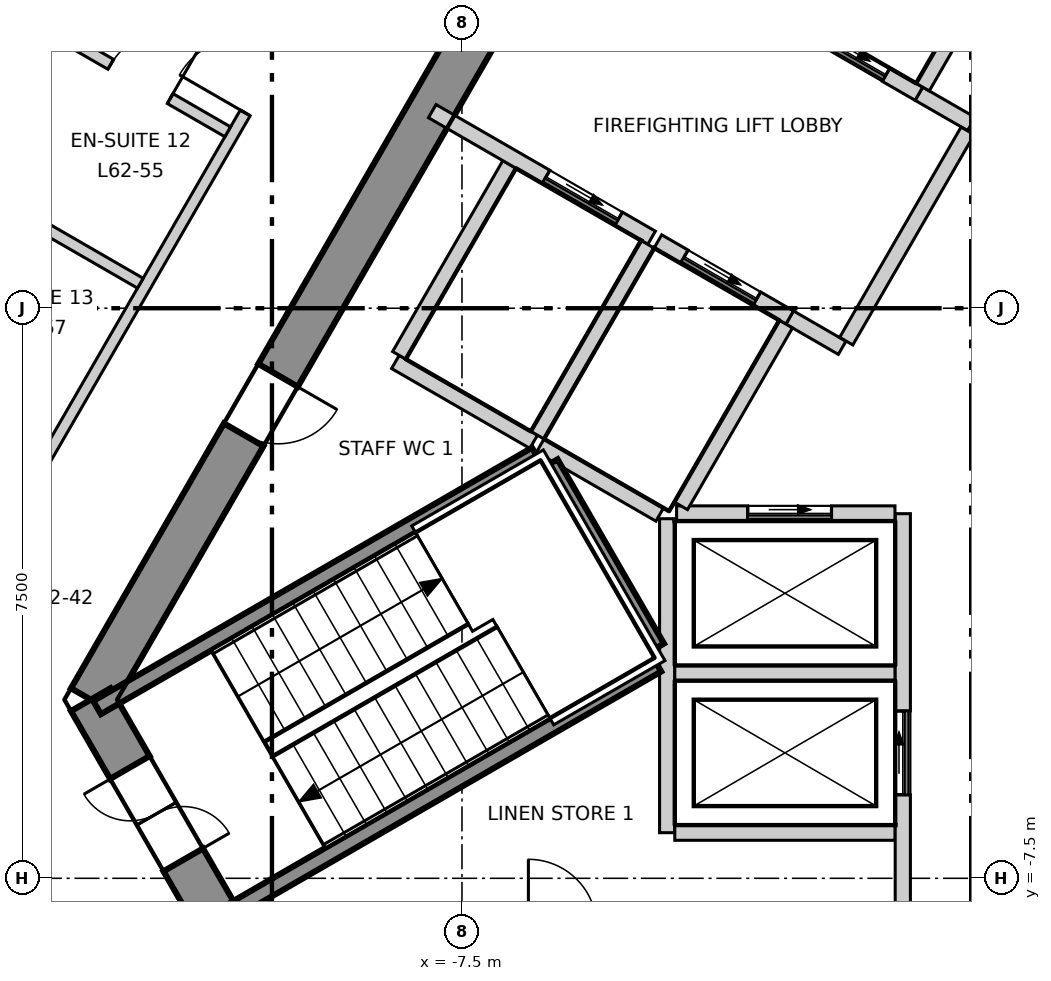
"""IFC4 building model, lengths in metres.
Left out: names, types, materials, properties, quantities, classifications, styles, units other than length and angle.
Written with IfcOpenShell. Run it as: python <this file> out.ifc"""

import sys

from ifc_helpers import new_model, si_unit, direction, frame, frame_2d, origin, place, context, subcontext, project, spatial, polyline, rectangle, outline, extrude, element, fill, save


model = new_model("IFC4")
c1 = context("Model", 3, precision=1e-05, world=origin(), true_north=direction((0.0, 1.0)))
c2 = subcontext(c1, "Body", "Model", "MODEL_VIEW")
j1 = project(units=[si_unit("LENGTHUNIT", "METRE"), si_unit("PLANEANGLEUNIT", "RADIAN")], contexts=[c1])
p1 = place(None, origin())
s1 = spatial("IfcSite", under=j1, at=p1, CompositionType="ELEMENT")
p2 = place(p1, origin())
s2 = spatial("IfcBuilding", under=s1, at=p2, CompositionType="ELEMENT")
p3 = place(p2, frame((0.0, 0.0, 268.3)))
s3 = spatial("IfcBuildingStorey", under=s2, at=p3, CompositionType="ELEMENT", Elevation=268.3)
p4 = place(p3, frame((-1.732, 13.3, -0.3), z_axis=(0.0, 0.0, 1.0), x_axis=(-0.500000539815, -0.866025092122, 0.0)))
e1 = element("IfcWall", 1, at=p4, inside=s3, PredefinedType="SHEAR", context=c2, shape_type="SweptSolid", body=[
    extrude(outline(polyline([(-0.173, -0.3), (1.795, -0.3), (3.763, -0.3), (5.732, -0.3), (7.7, -0.3), (9.668, -0.301), (11.637, -0.301), (13.605, -0.301), (15.573, -0.301), (17.542, -0.301), (19.51, -0.301), (21.478, -0.301), (21.131, 0.3), (19.226, 0.3), (17.321, 0.3), (15.415, 0.3), (13.51, 0.3), (11.605, 0.3), (9.699, 0.3), (7.794, 0.3), (5.889, 0.3), (3.984, 0.3), (2.078, 0.3), (0.173, 0.3), (-0.173, -0.3)])), origin(), (0.0, 0.0, 1.0), 3.6),
])
p5 = place(p4, frame((10.102, 0.0, 0.3)))
e2 = element("IfcOpeningElement", 2, at=p5, cuts=e1, PredefinedType="OPENING", context=c2, shape_type="SweptSolid", body=[
    extrude(rectangle(XDim=1.1, YDim=2.1, at=frame_2d((0.55, 1.05))), frame((0.0, 0.31, 0.0), z_axis=(0.0, -1.0, 0.0), x_axis=(1.0, 0.0, 0.0)), (0.0, 0.0, 1.0), 0.621),
])
p6 = place(p4, frame((16.378, 0.0, 0.3)))
e3 = element("IfcOpeningElement", 3, at=p6, cuts=e1, PredefinedType="OPENING", context=c2, shape_type="SweptSolid", body=[
    extrude(rectangle(XDim=0.9, YDim=2.1, at=frame_2d((0.45, 1.05))), frame((0.0, 0.31, 0.0), z_axis=(0.0, -1.0, 0.0), x_axis=(1.0, 0.0, 0.0)), (0.0, 0.0, 1.0), 0.621),
])
p7 = place(p4, frame((4.026, 0.0, 0.3)))
e4 = element("IfcOpeningElement", 4, at=p7, cuts=e1, PredefinedType="OPENING", context=c2, shape_type="SweptSolid", body=[
    extrude(rectangle(XDim=0.9, YDim=2.1, at=frame_2d((0.45, 1.05))), frame((0.0, 0.31, 0.0), z_axis=(0.0, -1.0, 0.0), x_axis=(1.0, 0.0, 0.0)), (0.0, 0.0, 1.0), 0.621),
])
p8 = place(p3, frame((-12.384, -5.15, -0.3), z_axis=(0.0, 0.0, 1.0), x_axis=(0.49997462182, -0.866040055388, 0.0)))
e5 = element("IfcWall", 5, at=p8, inside=s3, PredefinedType="SHEAR", context=c2, shape_type="SweptSolid", body=[
    extrude(outline(polyline([(-0.173, -0.301), (1.732, -0.301), (3.637, -0.3), (3.291, 0.3), (1.732, 0.3), (0.173, 0.3), (-0.173, -0.301)])), origin(), (0.0, 0.0, 1.0), 3.6),
])
p9 = place(p8, frame((1.032, 0.0, 0.3)))
e6 = element("IfcOpeningElement", 6, at=p9, cuts=e5, PredefinedType="OPENING", context=c2, shape_type="SweptSolid", body=[
    extrude(rectangle(XDim=1.4, YDim=2.1, at=frame_2d((0.7, 1.05))), frame((0.0, 0.31, 0.0), z_axis=(0.0, -1.0, 0.0), x_axis=(1.0, 0.0, 0.0)), (0.0, 0.0, 1.0), 0.621),
])
p10 = place(p3, frame((-2.577, 28.771, 0.0), z_axis=(0.0, 0.0, 1.0), x_axis=(-0.49999909388, -0.866025926932, 0.0)))
e7 = element("IfcWall", 7, at=p10, inside=s3, PredefinedType="ELEMENTEDWALL", context=c2, shape_type="SweptSolid", body=[
    extrude(rectangle(XDim=47.236, YDim=0.2, at=frame_2d((23.618, 0.0))), origin(), (0.0, 0.0, 1.0), 3.3),
])
p11 = place(p10, frame((2.243, 0.0, 0.9)))
e8 = element("IfcOpeningElement", 8, at=p11, cuts=e7, PredefinedType="OPENING", context=c2, shape_type="SweptSolid", body=[
    extrude(rectangle(XDim=3.7, YDim=2.2, at=frame_2d((1.85, 1.1))), frame((0.0, 0.11, 0.0), z_axis=(0.0, -1.0, 0.0), x_axis=(1.0, 0.0, 0.0)), (0.0, 0.0, 1.0), 0.22),
])
p12 = place(p10, frame((7.824, 0.0, 0.9)))
e9 = element("IfcOpeningElement", 9, at=p12, cuts=e7, PredefinedType="OPENING", context=c2, shape_type="SweptSolid", body=[
    extrude(rectangle(XDim=3.7, YDim=2.2, at=frame_2d((1.85, 1.1))), frame((0.0, 0.11, 0.0), z_axis=(0.0, -1.0, 0.0), x_axis=(1.0, 0.0, 0.0)), (0.0, 0.0, 1.0), 0.22),
])
p13 = place(p10, frame((13.406, 0.0, 0.9)))
e10 = element("IfcOpeningElement", 10, at=p13, cuts=e7, PredefinedType="OPENING", context=c2, shape_type="SweptSolid", body=[
    extrude(rectangle(XDim=3.7, YDim=2.2, at=frame_2d((1.85, 1.1))), frame((0.0, 0.11, 0.0), z_axis=(0.0, -1.0, 0.0), x_axis=(1.0, 0.0, 0.0)), (0.0, 0.0, 1.0), 0.22),
])
p14 = place(p10, frame((18.987, 0.0, 0.9)))
e11 = element("IfcOpeningElement", 11, at=p14, cuts=e7, PredefinedType="OPENING", context=c2, shape_type="SweptSolid", body=[
    extrude(rectangle(XDim=3.7, YDim=2.2, at=frame_2d((1.85, 1.1))), frame((0.0, 0.11, 0.0), z_axis=(0.0, -1.0, 0.0), x_axis=(1.0, 0.0, 0.0)), (0.0, 0.0, 1.0), 0.22),
])
p15 = place(p10, frame((24.569, 0.0, 0.9)))
e12 = element("IfcOpeningElement", 12, at=p15, cuts=e7, PredefinedType="OPENING", context=c2, shape_type="SweptSolid", body=[
    extrude(rectangle(XDim=3.7, YDim=2.2, at=frame_2d((1.85, 1.1))), frame((0.0, 0.11, 0.0), z_axis=(0.0, -1.0, 0.0), x_axis=(1.0, 0.0, 0.0)), (0.0, 0.0, 1.0), 0.22),
])
p16 = place(p10, frame((30.15, 0.0, 0.9)))
e13 = element("IfcOpeningElement", 13, at=p16, cuts=e7, PredefinedType="OPENING", context=c2, shape_type="SweptSolid", body=[
    extrude(rectangle(XDim=3.7, YDim=2.2, at=frame_2d((1.85, 1.1))), frame((0.0, 0.11, 0.0), z_axis=(0.0, -1.0, 0.0), x_axis=(1.0, 0.0, 0.0)), (0.0, 0.0, 1.0), 0.22),
])
p17 = place(p10, frame((35.731, 0.0, 0.9)))
e14 = element("IfcOpeningElement", 14, at=p17, cuts=e7, PredefinedType="OPENING", context=c2, shape_type="SweptSolid", body=[
    extrude(rectangle(XDim=3.7, YDim=2.2, at=frame_2d((1.85, 1.1))), frame((0.0, 0.11, 0.0), z_axis=(0.0, -1.0, 0.0), x_axis=(1.0, 0.0, 0.0)), (0.0, 0.0, 1.0), 0.22),
])
p18 = place(p10, frame((41.313, 0.0, 0.9)))
e15 = element("IfcOpeningElement", 15, at=p18, cuts=e7, PredefinedType="OPENING", context=c2, shape_type="SweptSolid", body=[
    extrude(rectangle(XDim=3.7, YDim=2.2, at=frame_2d((1.85, 1.1))), frame((0.0, 0.11, 0.0), z_axis=(0.0, -1.0, 0.0), x_axis=(1.0, 0.0, 0.0)), (0.0, 0.0, 1.0), 0.22),
])
p19 = place(p3, frame((-17.678, -10.12, 0.0), z_axis=(0.0, 0.0, 1.0), x_axis=(0.49998824015, 0.86603219323, 0.0)))
e16 = element("IfcWall", 16, at=p19, inside=s3, PredefinedType="PARTITIONING", context=c2, shape_type="SweptSolid", body=[
    extrude(rectangle(XDim=35.357, YDim=0.15, at=frame_2d((17.678, 0.0))), origin(), (0.0, 0.0, 1.0), 3.3),
])
p20 = place(p19, frame((31.607, 0.0, 0.0)))
e17 = element("IfcOpeningElement", 17, at=p20, cuts=e16, PredefinedType="OPENING", context=c2, shape_type="SweptSolid", body=[
    extrude(rectangle(XDim=1.0, YDim=2.1, at=frame_2d((0.5, 1.05))), frame((0.0, 0.085, 0.0), z_axis=(0.0, -1.0, 0.0), x_axis=(1.0, 0.0, 0.0)), (0.0, 0.0, 1.0), 0.17),
])
p21 = place(p19, frame((19.416, 0.0, 0.0)))
e18 = element("IfcOpeningElement", 18, at=p21, cuts=e16, PredefinedType="OPENING", context=c2, shape_type="SweptSolid", body=[
    extrude(rectangle(XDim=1.0, YDim=2.1, at=frame_2d((0.5, 1.05))), frame((0.0, 0.085, 0.0), z_axis=(0.0, -1.0, 0.0), x_axis=(1.0, 0.0, 0.0)), (0.0, 0.0, 1.0), 0.17),
])
p22 = place(p19, frame((24.916, 0.0, 0.0)))
e19 = element("IfcOpeningElement", 19, at=p22, cuts=e16, PredefinedType="OPENING", context=c2, shape_type="SweptSolid", body=[
    extrude(rectangle(XDim=0.9, YDim=2.1, at=frame_2d((0.45, 1.05))), frame((0.0, 0.085, 0.0), z_axis=(0.0, -1.0, 0.0), x_axis=(1.0, 0.0, 0.0)), (0.0, 0.0, 1.0), 0.17),
])
p23 = place(p19, frame((22.816, 0.0, 0.0)))
e20 = element("IfcOpeningElement", 20, at=p23, cuts=e16, PredefinedType="OPENING", context=c2, shape_type="SweptSolid", body=[
    extrude(rectangle(XDim=0.9, YDim=2.1, at=frame_2d((0.45, 1.05))), frame((0.0, 0.085, 0.0), z_axis=(0.0, -1.0, 0.0), x_axis=(1.0, 0.0, 0.0)), (0.0, 0.0, 1.0), 0.17),
])
p24 = place(p19, frame((14.654, 0.0, 0.0)))
e21 = element("IfcOpeningElement", 21, at=p24, cuts=e16, PredefinedType="OPENING", context=c2, shape_type="SweptSolid", body=[
    extrude(rectangle(XDim=1.0, YDim=2.1, at=frame_2d((0.5, 1.05))), frame((0.0, 0.085, 0.0), z_axis=(0.0, -1.0, 0.0), x_axis=(1.0, 0.0, 0.0)), (0.0, 0.0, 1.0), 0.17),
])
p25 = place(p19, frame((7.672, 0.0, 0.0)))
e22 = element("IfcOpeningElement", 22, at=p25, cuts=e16, PredefinedType="OPENING", context=c2, shape_type="SweptSolid", body=[
    extrude(rectangle(XDim=1.0, YDim=2.1, at=frame_2d((0.5, 1.05))), frame((0.0, 0.085, 0.0), z_axis=(0.0, -1.0, 0.0), x_axis=(1.0, 0.0, 0.0)), (0.0, 0.0, 1.0), 0.17),
])
p26 = place(p19, frame((2.69, 0.0, 0.0)))
e23 = element("IfcOpeningElement", 23, at=p26, cuts=e16, PredefinedType="OPENING", context=c2, shape_type="SweptSolid", body=[
    extrude(rectangle(XDim=1.0, YDim=2.1, at=frame_2d((0.5, 1.05))), frame((0.0, 0.085, 0.0), z_axis=(0.0, -1.0, 0.0), x_axis=(1.0, 0.0, 0.0)), (0.0, 0.0, 1.0), 0.17),
])
p27 = place(p3, frame((-17.112, 3.435, 0.0), z_axis=(0.0, 0.0, 1.0), x_axis=(0.866043575568, -0.499968524226, 0.0)))
e24 = element("IfcWall", 24, at=p27, inside=s3, PredefinedType="PARTITIONING", context=c2, shape_type="SweptSolid", body=[
    extrude(rectangle(XDim=6.212, YDim=0.15, at=frame_2d((3.106, 0.0))), origin(), (0.0, 0.0, 1.0), 3.3),
])
p28 = place(p3, frame((-12.856, 3.633, 0.0), z_axis=(0.0, 0.0, 1.0), x_axis=(0.866163910271, -0.499760022954, 0.0)))
e25 = element("IfcWall", 25, at=p28, inside=s3, PredefinedType="PARTITIONING", context=c2, shape_type="SweptSolid", body=[
    extrude(rectangle(XDim=2.625, YDim=0.15, at=frame_2d((1.312, 0.0))), origin(), (0.0, 0.0, 1.0), 3.3),
])
p29 = place(p28, frame((0.85, 0.0, 0.0)))
e26 = element("IfcOpeningElement", 26, at=p29, cuts=e25, PredefinedType="OPENING", context=c2, shape_type="SweptSolid", body=[
    extrude(rectangle(XDim=0.9, YDim=2.1, at=frame_2d((0.45, 1.05))), frame((0.0, 0.085, 0.0), z_axis=(0.0, -1.0, 0.0), x_axis=(1.0, 0.0, 0.0)), (0.0, 0.0, 1.0), 0.17),
])
p30 = place(p3, frame((-13.968, 1.707, 0.0), z_axis=(0.0, 0.0, 1.0), x_axis=(0.500158362642, 0.865933953763, 0.0)))
e27 = element("IfcWall", 27, at=p30, inside=s3, PredefinedType="PARTITIONING", context=c2, shape_type="SweptSolid", body=[
    extrude(rectangle(XDim=2.149, YDim=0.15, at=frame_2d((1.075, 0.0))), origin(), (0.0, 0.0, 1.0), 3.3),
])
p31 = place(p3, frame((-8.376, -0.707, 0.0), z_axis=(0.0, 0.0, 1.0), x_axis=(0.866067520717, -0.499927044236, 0.0)))
e28 = element("IfcWall", 28, at=p31, inside=s3, PredefinedType="SOLIDWALL", context=c2, shape_type="SweptSolid", body=[
    extrude(rectangle(XDim=2.1, YDim=0.2, at=frame_2d((1.05, 0.0))), origin(), (0.0, 0.0, 1.0), 3.3),
])
p32 = place(p3, frame((-8.326, -0.62, 0.0), z_axis=(0.0, 0.0, 1.0), x_axis=(0.500023687443, 0.866011727401, 0.0)))
e29 = element("IfcWall", 29, at=p32, inside=s3, PredefinedType="SOLIDWALL", context=c2, shape_type="SweptSolid", body=[
    extrude(rectangle(XDim=2.9, YDim=0.2, at=frame_2d((1.45, 0.0))), origin(), (0.0, 0.0, 1.0), 3.3),
])
p33 = place(p3, frame((-4.8, -6.9, 0.0), z_axis=(0.0, 0.0, 1.0), x_axis=(0.0, 1.0, 0.0)))
e30 = element("IfcWall", 30, at=p33, inside=s3, PredefinedType="SOLIDWALL", context=c2, shape_type="SweptSolid", body=[
    extrude(rectangle(XDim=4.131, YDim=0.2, at=frame_2d((2.065, 0.0))), origin(), (0.0, 0.0, 1.0), 3.3),
])
for number, where, z_axis, x_axis in (
    (31, (-4.7, -6.9, 0.0), (0.0, 0.0, 1.0), (1.0, 0.0, 0.0)),
    (32, (-4.7, -4.8, 0.0), (0.0, 0.0, 1.0), (1.0, 0.0, 0.0)),
):
    element("IfcWall", number, at=place(p3, frame(where, z_axis=z_axis, x_axis=x_axis)), inside=s3, PredefinedType="SOLIDWALL", context=c2, shape_type="SweptSolid", body=[
        extrude(rectangle(XDim=2.9, YDim=0.2, at=frame_2d((1.45, 0.0))), origin(), (0.0, 0.0, 1.0), 3.3),
    ])
p34 = place(p3, frame((-1.7, -8.13, 0.0), z_axis=(0.0, 0.0, 1.0), x_axis=(0.0, 1.0, 0.0)))
e33 = element("IfcWall", 33, at=p34, inside=s3, PredefinedType="SOLIDWALL", context=c2, shape_type="SweptSolid", body=[
    extrude(rectangle(XDim=5.427, YDim=0.2, at=frame_2d((2.713, 0.0))), origin(), (0.0, 0.0, 1.0), 3.3),
])
p35 = place(p34, frame((1.73, 0.0, 0.0)))
e34 = element("IfcOpeningElement", 34, at=p35, cuts=e33, PredefinedType="OPENING", context=c2, shape_type="SweptSolid", body=[
    extrude(rectangle(XDim=1.1, YDim=2.1, at=frame_2d((0.55, 1.05))), frame((0.0, 0.11, 0.0), z_axis=(0.0, -1.0, 0.0), x_axis=(1.0, 0.0, 0.0)), (0.0, 0.0, 1.0), 0.22),
])
p36 = place(p3, frame((-4.676, -2.7, 0.0), z_axis=(0.0, 0.0, 1.0), x_axis=(1.0, 0.0, 0.0)))
e35 = element("IfcWall", 35, at=p36, inside=s3, PredefinedType="SOLIDWALL", context=c2, shape_type="SweptSolid", body=[
    extrude(rectangle(XDim=2.873, YDim=0.2, at=frame_2d((1.437, 0.0))), origin(), (0.0, 0.0, 1.0), 3.3),
])
p37 = place(p36, frame((0.937, 0.0, 0.0)))
e36 = element("IfcOpeningElement", 36, at=p37, cuts=e35, PredefinedType="OPENING", context=c2, shape_type="SweptSolid", body=[
    extrude(rectangle(XDim=1.1, YDim=2.1, at=frame_2d((0.55, 1.05))), frame((0.0, 0.11, 0.0), z_axis=(0.0, -1.0, 0.0), x_axis=(1.0, 0.0, 0.0)), (0.0, 0.0, 1.0), 0.22),
])
p38 = place(p3, frame((-7.891, 2.593, 0.0), z_axis=(0.0, 0.0, 1.0), x_axis=(0.866070917804, -0.499921159118, 0.0)))
e37 = element("IfcWall", 37, at=p38, inside=s3, PredefinedType="SOLIDWALL", context=c2, shape_type="SweptSolid", body=[
    extrude(rectangle(XDim=3.333, YDim=0.2, at=frame_2d((1.666, 0.0))), origin(), (0.0, 0.0, 1.0), 3.3),
])
p39 = place(p38, frame((1.73, 0.0, 0.0)))
e38 = element("IfcOpeningElement", 38, at=p39, cuts=e37, PredefinedType="OPENING", context=c2, shape_type="SweptSolid", body=[
    extrude(rectangle(XDim=1.1, YDim=2.1, at=frame_2d((0.55, 1.05))), frame((0.0, 0.11, 0.0), z_axis=(0.0, -1.0, 0.0), x_axis=(1.0, 0.0, 0.0)), (0.0, 0.0, 1.0), 0.22),
])
p40 = place(p3, frame((-3.188, -0.122, 0.0), z_axis=(0.0, 0.0, 1.0), x_axis=(0.865705793592, -0.50055317294, 0.0)))
e39 = element("IfcWall", 39, at=p40, inside=s3, PredefinedType="SOLIDWALL", context=c2, shape_type="SweptSolid", body=[
    extrude(rectangle(XDim=0.797, YDim=0.2, at=frame_2d((0.398, 0.0))), origin(), (0.0, 0.0, 1.0), 3.3),
])
p41 = place(p3, frame((-1.488, 2.822, 0.0), z_axis=(0.0, 0.0, 1.0), x_axis=(0.866236612152, -0.499633997809, 0.0)))
e40 = element("IfcWall", 40, at=p41, inside=s3, PredefinedType="SOLIDWALL", context=c2, shape_type="SweptSolid", body=[
    extrude(rectangle(XDim=0.796, YDim=0.2, at=frame_2d((0.398, 0.0))), origin(), (0.0, 0.0, 1.0), 3.3),
])
p42 = place(p3, frame((-2.444, -0.433, 0.0), z_axis=(0.0, 0.0, 1.0), x_axis=(0.500035624827, 0.866004834804, 0.0)))
e41 = element("IfcWall", 41, at=p42, inside=s3, PredefinedType="SOLIDWALL", context=c2, shape_type="SweptSolid", body=[
    extrude(rectangle(XDim=3.194, YDim=0.2, at=frame_2d((1.597, 0.0))), origin(), (0.0, 0.0, 1.0), 3.3),
])
p43 = place(p3, frame((-6.507, -1.67, 0.0), z_axis=(0.0, 0.0, 1.0), x_axis=(0.50012328804, 0.865954211699, 0.0)))
e42 = element("IfcWall", 42, at=p43, inside=s3, PredefinedType="SOLIDWALL", context=c2, shape_type="SweptSolid", body=[
    extrude(rectangle(XDim=2.9, YDim=0.2, at=frame_2d((1.45, 0.0))), origin(), (0.0, 0.0, 1.0), 3.3),
])
p44 = place(p3, frame((-6.47, -1.807, 0.0), z_axis=(0.0, 0.0, 1.0), x_axis=(0.865883195159, -0.500246231712, 0.0)))
e43 = element("IfcWall", 43, at=p44, inside=s3, PredefinedType="SOLIDWALL", context=c2, shape_type="SweptSolid", body=[
    extrude(rectangle(XDim=1.815, YDim=0.2, at=frame_2d((0.908, 0.0))), origin(), (0.0, 0.0, 1.0), 3.3),
])
p45 = place(p3, frame((-4.922, 0.879, 0.0), z_axis=(0.0, 0.0, 1.0), x_axis=(0.866073918653, -0.499915960366, 0.0)))
e44 = element("IfcWall", 44, at=p45, inside=s3, PredefinedType="SOLIDWALL", context=c2, shape_type="SweptSolid", body=[
    extrude(rectangle(XDim=2.002, YDim=0.2, at=frame_2d((1.001, 0.0))), origin(), (0.0, 0.0, 1.0), 3.3),
])
p46 = place(p45, frame((0.402, 0.0, 0.0)))
e45 = element("IfcOpeningElement", 45, at=p46, cuts=e44, PredefinedType="OPENING", context=c2, shape_type="SweptSolid", body=[
    extrude(rectangle(XDim=1.1, YDim=2.1, at=frame_2d((0.55, 1.05))), frame((0.0, 0.11, 0.0), z_axis=(0.0, -1.0, 0.0), x_axis=(1.0, 0.0, 0.0)), (0.0, 0.0, 1.0), 0.22),
])
p47 = place(p3, frame((-4.619, -2.6, 0.0), z_axis=(0.0, 0.0, 1.0), x_axis=(0.50009492287, 0.865970593103, 0.0)))
e46 = element("IfcWall", 46, at=p47, inside=s3, PredefinedType="SOLIDWALL", context=c2, shape_type="SweptSolid", body=[
    extrude(rectangle(XDim=2.761, YDim=0.2, at=frame_2d((1.381, 0.0))), origin(), (0.0, 0.0, 1.0), 3.3),
])
p48 = place(p3, frame((-3.309, 3.873, 0.0), z_axis=(0.0, 0.0, 1.0), x_axis=(0.866098583652, -0.499873227325, 0.0)))
e47 = element("IfcWall", 47, at=p48, inside=s3, PredefinedType="SOLIDWALL", context=c2, shape_type="SweptSolid", body=[
    extrude(rectangle(XDim=2.103, YDim=0.2, at=frame_2d((1.051, 0.0))), origin(), (0.0, 0.0, 1.0), 3.3),
])
p49 = place(p48, frame((0.502, 0.0, 0.0)))
e48 = element("IfcOpeningElement", 48, at=p49, cuts=e47, PredefinedType="OPENING", context=c2, shape_type="SweptSolid", body=[
    extrude(rectangle(XDim=1.1, YDim=2.1, at=frame_2d((0.55, 1.05))), frame((0.0, 0.11, 0.0), z_axis=(0.0, -1.0, 0.0), x_axis=(1.0, 0.0, 0.0)), (0.0, 0.0, 1.0), 0.22),
])
p50 = place(p3, frame((-1.438, 2.909, 0.0), z_axis=(0.0, 0.0, 1.0), x_axis=(0.499829630636, 0.866123744241, 0.0)))
e49 = element("IfcWall", 49, at=p50, inside=s3, PredefinedType="SOLIDWALL", context=c2, shape_type="SweptSolid", body=[
    extrude(rectangle(XDim=2.761, YDim=0.2, at=frame_2d((1.38, 0.0))), origin(), (0.0, 0.0, 1.0), 3.3),
])
p51 = place(p3, frame((-12.301, -5.254, 0.0), z_axis=(0.0, 0.0, 1.0), x_axis=(0.866068467981, 0.499925403204, 0.0)))
e50 = element("IfcWall", 50, at=p51, inside=s3, PredefinedType="SOLIDWALL", context=c2, shape_type="SweptSolid", body=[
    extrude(rectangle(XDim=6.665, YDim=0.2, at=frame_2d((3.332, 0.0))), origin(), (0.0, 0.0, 1.0), 3.3),
])
p52 = place(p3, frame((-6.329, -2.038, 0.0), z_axis=(0.0, 0.0, 1.0), x_axis=(0.500200581029, -0.865909567298, 0.0)))
e51 = element("IfcWall", 51, at=p52, inside=s3, PredefinedType="SOLIDWALL", context=c2, shape_type="SweptSolid", body=[
    extrude(rectangle(XDim=2.799, YDim=0.2, at=frame_2d((1.399, 0.0))), origin(), (0.0, 0.0, 1.0), 3.3),
])
p53 = place(p3, frame((-10.701, -8.026, 0.0), z_axis=(0.0, 0.0, 1.0), x_axis=(0.866005022404, 0.500035299925, 0.0)))
e52 = element("IfcWall", 52, at=p53, inside=s3, PredefinedType="SOLIDWALL", context=c2, shape_type="SweptSolid", body=[
    extrude(rectangle(XDim=6.665, YDim=0.2, at=frame_2d((3.333, 0.0))), origin(), (0.0, 0.0, 1.0), 3.3),
])
p54 = place(p37, origin())
e53 = element("IfcDoor", 53, at=p54, inside=s3, OperationType="SLIDING_TO_LEFT", PredefinedType="DOOR", context=c2, shape_type="SweptSolid", body=[
    extrude(rectangle(XDim=1.1, YDim=2.1, at=frame_2d((0.55, 1.05))), frame((0.0, 0.025, 0.0), z_axis=(0.0, -1.0, 0.0), x_axis=(1.0, 0.0, 0.0)), (0.0, 0.0, 1.0), 0.05),
])
fill(e36, e53)
p55 = place(p35, origin())
e54 = element("IfcDoor", 54, at=p55, inside=s3, OperationType="SLIDING_TO_LEFT", PredefinedType="DOOR", context=c2, shape_type="SweptSolid", body=[
    extrude(rectangle(XDim=1.1, YDim=2.1, at=frame_2d((0.55, 1.05))), frame((0.0, 0.025, 0.0), z_axis=(0.0, -1.0, 0.0), x_axis=(1.0, 0.0, 0.0)), (0.0, 0.0, 1.0), 0.05),
])
fill(e34, e54)
p56 = place(p46, origin())
e55 = element("IfcDoor", 55, at=p56, inside=s3, OperationType="SLIDING_TO_LEFT", PredefinedType="DOOR", context=c2, shape_type="SweptSolid", body=[
    extrude(rectangle(XDim=1.1, YDim=2.1, at=frame_2d((0.55, 1.05))), frame((0.0, 0.025, 0.0), z_axis=(0.0, -1.0, 0.0), x_axis=(1.0, 0.0, 0.0)), (0.0, 0.0, 1.0), 0.05),
])
fill(e45, e55)
p57 = place(p49, origin())
e56 = element("IfcDoor", 56, at=p57, inside=s3, OperationType="SLIDING_TO_LEFT", PredefinedType="DOOR", context=c2, shape_type="SweptSolid", body=[
    extrude(rectangle(XDim=1.1, YDim=2.1, at=frame_2d((0.55, 1.05))), frame((0.0, 0.025, 0.0), z_axis=(0.0, -1.0, 0.0), x_axis=(1.0, 0.0, 0.0)), (0.0, 0.0, 1.0), 0.05),
])
fill(e48, e56)
p58 = place(p39, origin())
e57 = element("IfcDoor", 57, at=p58, inside=s3, OperationType="SLIDING_TO_LEFT", PredefinedType="DOOR", context=c2, shape_type="SweptSolid", body=[
    extrude(rectangle(XDim=1.1, YDim=2.1, at=frame_2d((0.55, 1.05))), frame((0.0, 0.025, 0.0), z_axis=(0.0, -1.0, 0.0), x_axis=(1.0, 0.0, 0.0)), (0.0, 0.0, 1.0), 0.05),
])
fill(e38, e57)
p59 = place(p24, origin())
e58 = element("IfcDoor", 58, at=p59, inside=s3, OperationType="SINGLE_SWING_RIGHT", PredefinedType="DOOR", context=c2, shape_type="SweptSolid", body=[
    extrude(rectangle(XDim=1.0, YDim=2.1, at=frame_2d((0.5, 1.05))), frame((0.0, 0.025, 0.0), z_axis=(0.0, -1.0, 0.0), x_axis=(1.0, 0.0, 0.0)), (0.0, 0.0, 1.0), 0.05),
])
fill(e21, e58)
p60 = place(p29, origin())
e59 = element("IfcDoor", 59, at=p60, inside=s3, OperationType="SINGLE_SWING_LEFT", PredefinedType="DOOR", context=c2, shape_type="SweptSolid", body=[
    extrude(rectangle(XDim=0.9, YDim=2.1, at=frame_2d((0.45, 1.05))), frame((0.0, 0.025, 0.0), z_axis=(0.0, -1.0, 0.0), x_axis=(1.0, 0.0, 0.0)), (0.0, 0.0, 1.0), 0.05),
])
fill(e26, e59)
p61 = place(p9, origin())
e60 = element("IfcDoor", 60, at=p61, inside=s3, OperationType="DOUBLE_DOOR_SINGLE_SWING", PredefinedType="DOOR", context=c2, shape_type="SweptSolid", body=[
    extrude(rectangle(XDim=1.4, YDim=2.1, at=frame_2d((0.7, 1.05))), frame((0.0, 0.025, 0.0), z_axis=(0.0, -1.0, 0.0), x_axis=(1.0, 0.0, 0.0)), (0.0, 0.0, 1.0), 0.05),
])
fill(e6, e60)
p62 = place(p6, origin())
e61 = element("IfcDoor", 61, at=p62, inside=s3, OperationType="SINGLE_SWING_RIGHT", PredefinedType="DOOR", context=c2, shape_type="SweptSolid", body=[
    extrude(rectangle(XDim=0.9, YDim=2.1, at=frame_2d((0.45, 1.05))), frame((0.0, 0.025, 0.0), z_axis=(0.0, -1.0, 0.0), x_axis=(1.0, 0.0, 0.0)), (0.0, 0.0, 1.0), 0.05),
])
fill(e3, e61)
save(model, sys.argv[1])
